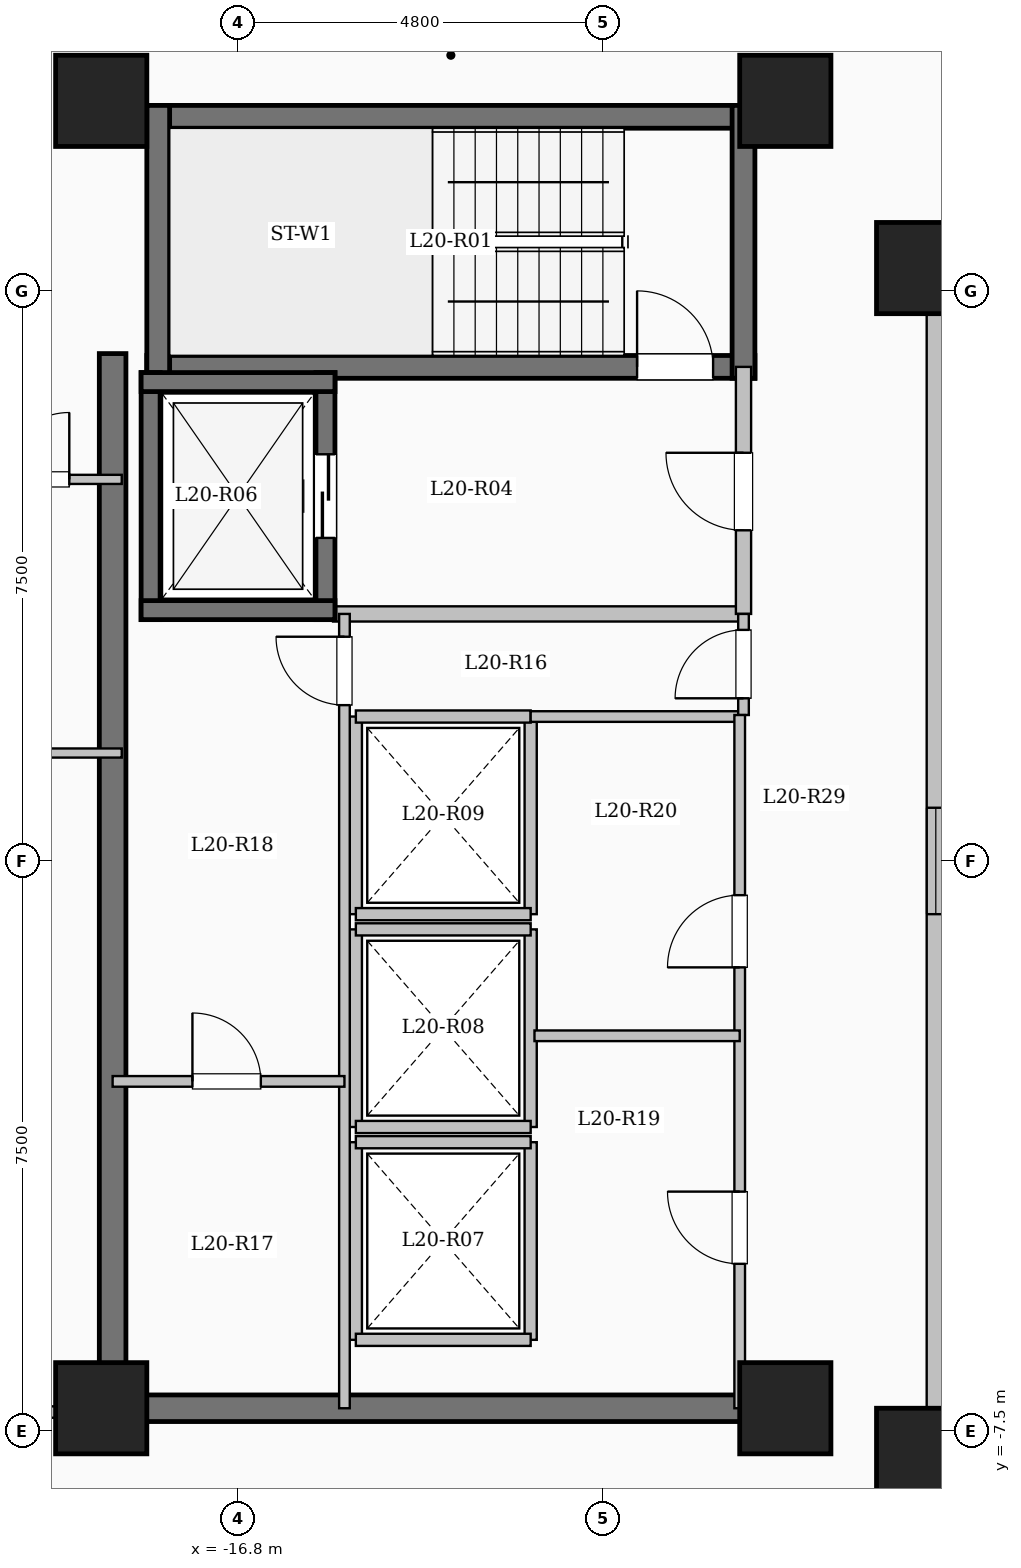
"""IFC4 building model, lengths in metres.
Left out: names, types, materials, properties, quantities, classifications, styles, units other than length and angle.
Written with IfcOpenShell. Run it as: python <this file> out.ifc"""

import sys

from ifc_helpers import new_model, si_unit, direction, frame, frame_2d, origin, origin_2d, place, context, subcontext, project, spatial, rectangle, extrude, element, fill, save


model = new_model("IFC4")
c1 = context("Model", 3, precision=1e-05, world=origin(), true_north=direction((0.0, 1.0)))
c2 = subcontext(c1, "Body", "Model", "MODEL_VIEW")
j1 = project(units=[si_unit("LENGTHUNIT", "METRE"), si_unit("PLANEANGLEUNIT", "RADIAN")], contexts=[c1])
p1 = place(None, origin())
s1 = spatial("IfcSite", under=j1, at=p1, CompositionType="ELEMENT")
p2 = place(p1, origin())
s2 = spatial("IfcBuilding", under=s1, at=p2, CompositionType="ELEMENT")
p3 = place(p2, frame((0.0, 0.0, 78.3)))
s3 = spatial("IfcBuildingStorey", under=s2, at=p3, CompositionType="ELEMENT", Elevation=78.3)
for number, where, z_axis, x_axis in (
    (1, (-7.8, -7.8, 0.0), (0.0, 0.0, 1.0), (1.0, 0.0, 0.0)),
    (2, (-7.8, 7.8, 0.0), (0.0, 0.0, 1.0), (1.0, 0.0, 0.0)),
    (3, (-9.6, -7.2, 0.0), (0.0, 0.0, 1.0), (1.0, 0.0, 0.0)),
    (4, (-9.6, 10.0, 0.0), (0.0, 0.0, 1.0), (1.0, 0.0, 0.0)),
    (5, (-18.6, -7.2, 0.0), (0.0, 0.0, 1.0), (1.0, 0.0, 0.0)),
    (6, (-18.6, 10.0, 0.0), (0.0, 0.0, 1.0), (1.0, 0.0, 0.0)),
):
    element("IfcColumn", number, at=place(p3, frame(where, z_axis=z_axis, x_axis=x_axis)), inside=s3, PredefinedType="COLUMN", context=c2, shape_type="SweptSolid", body=[
        extrude(rectangle(XDim=1.2, YDim=1.2, at=origin_2d()), origin(), (0.0, 0.0, 1.0), 3.35),
    ])
p4 = place(p3, frame((-7.62, -7.62, 0.0), z_axis=(0.0, 0.0, 1.0), x_axis=(1.0, 0.0, 0.0)))
e7 = element("IfcWall", 7, at=p4, inside=s3, PredefinedType="SOLIDWALL", context=c2, shape_type="SweptSolid", body=[
    extrude(rectangle(XDim=15.24, YDim=0.24, at=frame_2d((7.62, 0.0))), origin(), (0.0, 0.0, 1.0), 3.1),
])
p5 = place(p4, frame((6.92, 0.0, 0.95)))
e8 = element("IfcOpeningElement", 8, at=p5, cuts=e7, PredefinedType="OPENING", context=c2, shape_type="SweptSolid", body=[
    extrude(rectangle(XDim=1.4, YDim=1.5, at=frame_2d((0.7, 0.75))), frame((0.0, 0.13, 0.0), z_axis=(0.0, -1.0, 0.0), x_axis=(1.0, 0.0, 0.0)), (0.0, 0.0, 1.0), 0.26),
])
p6 = place(p3, frame((7.62, 7.62, 0.0), z_axis=(0.0, 0.0, 1.0), x_axis=(-1.0, 0.0, 0.0)))
e9 = element("IfcWall", 9, at=p6, inside=s3, PredefinedType="SOLIDWALL", context=c2, shape_type="SweptSolid", body=[
    extrude(rectangle(XDim=15.24, YDim=0.24, at=frame_2d((7.62, 0.0))), origin(), (0.0, 0.0, 1.0), 3.1),
])
p7 = place(p6, frame((6.92, 0.0, 0.95)))
e10 = element("IfcOpeningElement", 10, at=p7, cuts=e9, PredefinedType="OPENING", context=c2, shape_type="SweptSolid", body=[
    extrude(rectangle(XDim=1.4, YDim=1.5, at=frame_2d((0.7, 0.75))), frame((0.0, 0.13, 0.0), z_axis=(0.0, -1.0, 0.0), x_axis=(1.0, 0.0, 0.0)), (0.0, 0.0, 1.0), 0.26),
])
p8 = place(p3, frame((-7.62, 7.62, 0.0), z_axis=(0.0, 0.0, 1.0), x_axis=(0.0, -1.0, 0.0)))
e11 = element("IfcWall", 11, at=p8, inside=s3, PredefinedType="SOLIDWALL", context=c2, shape_type="SweptSolid", body=[
    extrude(rectangle(XDim=15.24, YDim=0.24, at=frame_2d((7.62, 0.0))), origin(), (0.0, 0.0, 1.0), 3.1),
])
p9 = place(p8, frame((6.92, 0.0, 0.95)))
e12 = element("IfcOpeningElement", 12, at=p9, cuts=e11, PredefinedType="OPENING", context=c2, shape_type="SweptSolid", body=[
    extrude(rectangle(XDim=1.4, YDim=1.5, at=frame_2d((0.7, 0.75))), frame((0.0, 0.13, 0.0), z_axis=(0.0, -1.0, 0.0), x_axis=(1.0, 0.0, 0.0)), (0.0, 0.0, 1.0), 0.26),
])
p10 = place(p3, frame((-18.0, 9.79, 0.0), z_axis=(0.0, 0.0, 1.0), x_axis=(1.0, 0.0, 0.0)))
e13 = element("IfcWall", 13, at=p10, inside=s3, PredefinedType="SHEAR", context=c2, shape_type="SweptSolid", body=[
    extrude(rectangle(XDim=8.0, YDim=0.3, at=frame_2d((4.0, 0.0))), origin(), (0.0, 0.0, 1.0), 3.35),
])
p11 = place(p3, frame((-18.0, 6.5, 0.0), z_axis=(0.0, 0.0, 1.0), x_axis=(1.0, 0.0, 0.0)))
e14 = element("IfcWall", 14, at=p11, inside=s3, PredefinedType="SHEAR", context=c2, shape_type="SweptSolid", body=[
    extrude(rectangle(XDim=8.0, YDim=0.3, at=frame_2d((4.0, 0.0))), origin(), (0.0, 0.0, 1.0), 3.35),
])
p12 = place(p11, frame((6.45, 0.0, 0.0)))
e15 = element("IfcOpeningElement", 15, at=p12, cuts=e14, PredefinedType="OPENING", context=c2, shape_type="SweptSolid", body=[
    extrude(rectangle(XDim=1.0, YDim=2.15, at=frame_2d((0.5, 1.075))), frame((0.0, 0.16, 0.0), z_axis=(0.0, -1.0, 0.0), x_axis=(1.0, 0.0, 0.0)), (0.0, 0.0, 1.0), 0.32),
])
for number, where, z_axis, x_axis in (
    (16, (-17.85, 6.35, 0.0), (0.0, 0.0, 1.0), (0.0, 1.0, 0.0)),
    (17, (-10.15, 6.35, 0.0), (0.0, 0.0, 1.0), (0.0, 1.0, 0.0)),
):
    element("IfcWall", number, at=place(p3, frame(where, z_axis=z_axis, x_axis=x_axis)), inside=s3, PredefinedType="SHEAR", context=c2, shape_type="SweptSolid", body=[
        extrude(rectangle(XDim=3.59, YDim=0.3, at=frame_2d((1.795, 0.0))), origin(), (0.0, 0.0, 1.0), 3.35),
    ])
p13 = place(p3, frame((-15.55, 3.25, 0.0), z_axis=(0.0, 0.0, 1.0), x_axis=(1.0, 0.0, 0.0)))
e18 = element("IfcWall", 18, at=p13, inside=s3, PredefinedType="SOLIDWALL", context=c2, shape_type="SweptSolid", body=[
    extrude(rectangle(XDim=5.4, YDim=0.2, at=frame_2d((2.7, 0.0))), origin(), (0.0, 0.0, 1.0), 3.1),
])
p14 = place(p3, frame((-10.15, 3.25, 0.0), z_axis=(0.0, 0.0, 1.0), x_axis=(0.0, 1.0, 0.0)))
e19 = element("IfcWall", 19, at=p14, inside=s3, PredefinedType="SOLIDWALL", context=c2, shape_type="SweptSolid", body=[
    extrude(rectangle(XDim=3.25, YDim=0.2, at=frame_2d((1.625, 0.0))), origin(), (0.0, 0.0, 1.0), 3.1),
])
p15 = place(p14, frame((1.1, 0.0, 0.0)))
e20 = element("IfcOpeningElement", 20, at=p15, cuts=e19, PredefinedType="OPENING", context=c2, shape_type="SweptSolid", body=[
    extrude(rectangle(XDim=1.02, YDim=2.15, at=frame_2d((0.51, 1.075))), frame((0.0, 0.11, 0.0), z_axis=(0.0, -1.0, 0.0), x_axis=(1.0, 0.0, 0.0)), (0.0, 0.0, 1.0), 0.22),
])
p16 = place(p3, frame((-17.95, 3.175, 0.0), z_axis=(0.0, 0.0, 1.0), x_axis=(0.0, 1.0, 0.0)))
e21 = element("IfcWall", 21, at=p16, inside=s3, PredefinedType="SHEAR", context=c2, shape_type="SweptSolid", body=[
    extrude(rectangle(XDim=3.25, YDim=0.25, at=frame_2d((1.625, 0.0))), origin(), (0.0, 0.0, 1.0), 3.35),
])
p17 = place(p3, frame((-15.65, 3.175, 0.0), z_axis=(0.0, 0.0, 1.0), x_axis=(0.0, 1.0, 0.0)))
e22 = element("IfcWall", 22, at=p17, inside=s3, PredefinedType="SHEAR", context=c2, shape_type="SweptSolid", body=[
    extrude(rectangle(XDim=3.25, YDim=0.25, at=frame_2d((1.625, 0.0))), origin(), (0.0, 0.0, 1.0), 3.35),
])
p18 = place(p17, frame((1.075, 0.0, 0.0)))
e23 = element("IfcOpeningElement", 23, at=p18, cuts=e22, PredefinedType="OPENING", context=c2, shape_type="SweptSolid", body=[
    extrude(rectangle(XDim=1.1, YDim=2.15, at=frame_2d((0.55, 1.075))), frame((0.0, 0.135, 0.0), z_axis=(0.0, -1.0, 0.0), x_axis=(1.0, 0.0, 0.0)), (0.0, 0.0, 1.0), 0.27),
])
for number, where, z_axis, x_axis in (
    (24, (-18.075, 3.3, 0.0), (0.0, 0.0, 1.0), (1.0, 0.0, 0.0)),
    (25, (-18.075, 6.3, 0.0), (0.0, 0.0, 1.0), (1.0, 0.0, 0.0)),
):
    element("IfcWall", number, at=place(p3, frame(where, z_axis=z_axis, x_axis=x_axis)), inside=s3, PredefinedType="SHEAR", context=c2, shape_type="SweptSolid", body=[
        extrude(rectangle(XDim=2.55, YDim=0.25, at=frame_2d((1.275, 0.0))), origin(), (0.0, 0.0, 1.0), 3.35),
    ])
for number, where, z_axis, x_axis in (
    (26, (-15.25, -6.3, 0.0), (0.0, 0.0, 1.0), (0.0, 1.0, 0.0)),
    (27, (-12.95, -6.3, 0.0), (0.0, 0.0, 1.0), (0.0, 1.0, 0.0)),
):
    element("IfcWall", number, at=place(p3, frame(where, z_axis=z_axis, x_axis=x_axis)), inside=s3, PredefinedType="SOLIDWALL", context=c2, shape_type="SweptSolid", body=[
        extrude(rectangle(XDim=2.6, YDim=0.16, at=frame_2d((1.3, 0.0))), origin(), (0.0, 0.0, 1.0), 3.1),
    ])
for number, where, z_axis, x_axis in (
    (28, (-15.25, -6.3, 0.0), (0.0, 0.0, 1.0), (1.0, 0.0, 0.0)),
    (29, (-15.25, -3.7, 0.0), (0.0, 0.0, 1.0), (1.0, 0.0, 0.0)),
):
    element("IfcWall", number, at=place(p3, frame(where, z_axis=z_axis, x_axis=x_axis)), inside=s3, PredefinedType="SOLIDWALL", context=c2, shape_type="SweptSolid", body=[
        extrude(rectangle(XDim=2.3, YDim=0.16, at=frame_2d((1.15, 0.0))), origin(), (0.0, 0.0, 1.0), 3.1),
    ])
for number, where, z_axis, x_axis in (
    (30, (-15.25, -3.5, 0.0), (0.0, 0.0, 1.0), (0.0, 1.0, 0.0)),
    (31, (-12.95, -3.5, 0.0), (0.0, 0.0, 1.0), (0.0, 1.0, 0.0)),
):
    element("IfcWall", number, at=place(p3, frame(where, z_axis=z_axis, x_axis=x_axis)), inside=s3, PredefinedType="SOLIDWALL", context=c2, shape_type="SweptSolid", body=[
        extrude(rectangle(XDim=2.6, YDim=0.16, at=frame_2d((1.3, 0.0))), origin(), (0.0, 0.0, 1.0), 3.1),
    ])
for number, where, z_axis, x_axis in (
    (32, (-15.25, -3.5, 0.0), (0.0, 0.0, 1.0), (1.0, 0.0, 0.0)),
    (33, (-15.25, -0.9, 0.0), (0.0, 0.0, 1.0), (1.0, 0.0, 0.0)),
):
    element("IfcWall", number, at=place(p3, frame(where, z_axis=z_axis, x_axis=x_axis)), inside=s3, PredefinedType="SOLIDWALL", context=c2, shape_type="SweptSolid", body=[
        extrude(rectangle(XDim=2.3, YDim=0.16, at=frame_2d((1.15, 0.0))), origin(), (0.0, 0.0, 1.0), 3.1),
    ])
for number, where, z_axis, x_axis in (
    (34, (-15.25, -0.7, 0.0), (0.0, 0.0, 1.0), (0.0, 1.0, 0.0)),
    (35, (-12.95, -0.7, 0.0), (0.0, 0.0, 1.0), (0.0, 1.0, 0.0)),
):
    element("IfcWall", number, at=place(p3, frame(where, z_axis=z_axis, x_axis=x_axis)), inside=s3, PredefinedType="SOLIDWALL", context=c2, shape_type="SweptSolid", body=[
        extrude(rectangle(XDim=2.6, YDim=0.16, at=frame_2d((1.3, 0.0))), origin(), (0.0, 0.0, 1.0), 3.1),
    ])
for number, where, z_axis, x_axis in (
    (36, (-15.25, -0.7, 0.0), (0.0, 0.0, 1.0), (1.0, 0.0, 0.0)),
    (37, (-15.25, 1.9, 0.0), (0.0, 0.0, 1.0), (1.0, 0.0, 0.0)),
):
    element("IfcWall", number, at=place(p3, frame(where, z_axis=z_axis, x_axis=x_axis)), inside=s3, PredefinedType="SOLIDWALL", context=c2, shape_type="SweptSolid", body=[
        extrude(rectangle(XDim=2.3, YDim=0.16, at=frame_2d((1.15, 0.0))), origin(), (0.0, 0.0, 1.0), 3.1),
    ])
p19 = place(p3, frame((-18.45, -7.375, 0.0), z_axis=(0.0, 0.0, 1.0), x_axis=(0.0, 1.0, 0.0)))
e38 = element("IfcWall", 38, at=p19, inside=s3, PredefinedType="SHEAR", context=c2, shape_type="SweptSolid", body=[
    extrude(rectangle(XDim=14.05, YDim=0.35, at=frame_2d((7.025, 0.0))), origin(), (0.0, 0.0, 1.0), 3.35),
])
p20 = place(p3, frame((-18.625, -7.2, 0.0), z_axis=(0.0, 0.0, 1.0), x_axis=(1.0, 0.0, 0.0)))
e39 = element("IfcWall", 39, at=p20, inside=s3, PredefinedType="SHEAR", context=c2, shape_type="SweptSolid", body=[
    extrude(rectangle(XDim=8.55, YDim=0.35, at=frame_2d((4.275, 0.0))), origin(), (0.0, 0.0, 1.0), 3.35),
])
p21 = place(p3, frame((-12.95, 1.9, 0.0), z_axis=(0.0, 0.0, 1.0), x_axis=(1.0, 0.0, 0.0)))
e40 = element("IfcWall", 40, at=p21, inside=s3, PredefinedType="PARTITIONING", context=c2, shape_type="SweptSolid", body=[
    extrude(rectangle(XDim=2.8, YDim=0.14, at=frame_2d((1.4, 0.0))), origin(), (0.0, 0.0, 1.0), 3.1),
])
p22 = place(p3, frame((-10.15, 1.92, 0.0), z_axis=(0.0, 0.0, 1.0), x_axis=(0.0, 1.0, 0.0)))
e41 = element("IfcWall", 41, at=p22, inside=s3, PredefinedType="PARTITIONING", context=c2, shape_type="SweptSolid", body=[
    extrude(rectangle(XDim=1.33, YDim=0.14, at=frame_2d((0.665, 0.0))), origin(), (0.0, 0.0, 1.0), 3.1),
])
p23 = place(p22, frame((0.22, 0.0, 0.0)))
e42 = element("IfcOpeningElement", 42, at=p23, cuts=e41, PredefinedType="OPENING", context=c2, shape_type="SweptSolid", body=[
    extrude(rectangle(XDim=0.9, YDim=2.08, at=frame_2d((0.45, 1.04))), frame((0.0, 0.08, 0.0), z_axis=(0.0, -1.0, 0.0), x_axis=(1.0, 0.0, 0.0)), (0.0, 0.0, 1.0), 0.16),
])
p24 = place(p3, frame((-15.4, -7.2, 0.0), z_axis=(0.0, 0.0, 1.0), x_axis=(0.0, 1.0, 0.0)))
e43 = element("IfcWall", 43, at=p24, inside=s3, PredefinedType="PARTITIONING", context=c2, shape_type="SweptSolid", body=[
    extrude(rectangle(XDim=10.45, YDim=0.14, at=frame_2d((5.225, 0.0))), origin(), (0.0, 0.0, 1.0), 3.1),
])
p25 = place(p24, frame((9.25, 0.0, 0.0)))
e44 = element("IfcOpeningElement", 44, at=p25, cuts=e43, PredefinedType="OPENING", context=c2, shape_type="SweptSolid", body=[
    extrude(rectangle(XDim=0.9, YDim=2.08, at=frame_2d((0.45, 1.04))), frame((0.0, 0.08, 0.0), z_axis=(0.0, -1.0, 0.0), x_axis=(1.0, 0.0, 0.0)), (0.0, 0.0, 1.0), 0.16),
])
p26 = place(p3, frame((-18.45, -2.9, 0.0), z_axis=(0.0, 0.0, 1.0), x_axis=(1.0, 0.0, 0.0)))
e45 = element("IfcWall", 45, at=p26, inside=s3, PredefinedType="PARTITIONING", context=c2, shape_type="SweptSolid", body=[
    extrude(rectangle(XDim=3.05, YDim=0.14, at=frame_2d((1.525, 0.0))), origin(), (0.0, 0.0, 1.0), 3.1),
])
p27 = place(p26, frame((1.05, 0.0, 0.0)))
e46 = element("IfcOpeningElement", 46, at=p27, cuts=e45, PredefinedType="OPENING", context=c2, shape_type="SweptSolid", body=[
    extrude(rectangle(XDim=0.9, YDim=2.08, at=frame_2d((0.45, 1.04))), frame((0.0, 0.08, 0.0), z_axis=(0.0, -1.0, 0.0), x_axis=(1.0, 0.0, 0.0)), (0.0, 0.0, 1.0), 0.16),
])
p28 = place(p3, frame((-10.2, -7.2, 0.0), z_axis=(0.0, 0.0, 1.0), x_axis=(0.0, 1.0, 0.0)))
e47 = element("IfcWall", 47, at=p28, inside=s3, PredefinedType="PARTITIONING", context=c2, shape_type="SweptSolid", body=[
    extrude(rectangle(XDim=9.12, YDim=0.14, at=frame_2d((4.56, 0.0))), origin(), (0.0, 0.0, 1.0), 3.1),
])
p29 = place(p28, frame((1.9, 0.0, 0.0)))
e48 = element("IfcOpeningElement", 48, at=p29, cuts=e47, PredefinedType="OPENING", context=c2, shape_type="SweptSolid", body=[
    extrude(rectangle(XDim=0.95, YDim=2.12, at=frame_2d((0.475, 1.06))), frame((0.0, 0.08, 0.0), z_axis=(0.0, -1.0, 0.0), x_axis=(1.0, 0.0, 0.0)), (0.0, 0.0, 1.0), 0.16),
])
p30 = place(p28, frame((5.8, 0.0, 0.0)))
e49 = element("IfcOpeningElement", 49, at=p30, cuts=e47, PredefinedType="OPENING", context=c2, shape_type="SweptSolid", body=[
    extrude(rectangle(XDim=0.95, YDim=2.12, at=frame_2d((0.475, 1.06))), frame((0.0, 0.08, 0.0), z_axis=(0.0, -1.0, 0.0), x_axis=(1.0, 0.0, 0.0)), (0.0, 0.0, 1.0), 0.16),
])
p31 = place(p3, frame((-12.9, -2.3, 0.0), z_axis=(0.0, 0.0, 1.0), x_axis=(1.0, 0.0, 0.0)))
e50 = element("IfcWall", 50, at=p31, inside=s3, PredefinedType="PARTITIONING", context=c2, shape_type="SweptSolid", body=[
    extrude(rectangle(XDim=2.7, YDim=0.14, at=frame_2d((1.35, 0.0))), origin(), (0.0, 0.0, 1.0), 3.1),
])
p32 = place(p3, frame((-26.88, -7.25, 0.0), z_axis=(0.0, 0.0, 1.0), x_axis=(1.0, 0.0, 0.0)))
e51 = element("IfcWall", 51, at=p32, inside=s3, PredefinedType="PARTITIONING", context=c2, shape_type="SweptSolid", body=[
    extrude(rectangle(XDim=8.43, YDim=0.15, at=frame_2d((4.215, 0.0))), origin(), (0.0, 0.0, 1.0), 3.1),
])
p33 = place(p32, frame((5.33, 0.0, 0.0)))
e52 = element("IfcOpeningElement", 52, at=p33, cuts=e51, PredefinedType="OPENING", context=c2, shape_type="SweptSolid", body=[
    extrude(rectangle(XDim=0.96, YDim=2.15, at=frame_2d((0.48, 1.075))), frame((0.0, 0.085, 0.0), z_axis=(0.0, -1.0, 0.0), x_axis=(1.0, 0.0, 0.0)), (0.0, 0.0, 1.0), 0.17),
])
p34 = place(p3, frame((-27.0, 1.42, 0.0), z_axis=(0.0, 0.0, 1.0), x_axis=(1.0, 0.0, 0.0)))
e53 = element("IfcWall", 53, at=p34, inside=s3, PredefinedType="PARTITIONING", context=c2, shape_type="SweptSolid", body=[
    extrude(rectangle(XDim=8.67, YDim=0.12, at=frame_2d((4.335, 0.0))), origin(), (0.0, 0.0, 1.0), 3.1),
])
p35 = place(p34, frame((1.763, 0.0, 0.0)))
e54 = element("IfcOpeningElement", 54, at=p35, cuts=e53, PredefinedType="OPENING", context=c2, shape_type="SweptSolid", body=[
    extrude(rectangle(XDim=0.88, YDim=2.1, at=frame_2d((0.44, 1.05))), frame((0.0, 0.07, 0.0), z_axis=(0.0, -1.0, 0.0), x_axis=(1.0, 0.0, 0.0)), (0.0, 0.0, 1.0), 0.14),
])
p36 = place(p34, frame((5.928, 0.0, 0.0)))
e55 = element("IfcOpeningElement", 55, at=p36, cuts=e53, PredefinedType="OPENING", context=c2, shape_type="SweptSolid", body=[
    extrude(rectangle(XDim=0.88, YDim=2.1, at=frame_2d((0.44, 1.05))), frame((0.0, 0.07, 0.0), z_axis=(0.0, -1.0, 0.0), x_axis=(1.0, 0.0, 0.0)), (0.0, 0.0, 1.0), 0.14),
])
p37 = place(p3, frame((-27.0, 5.02, 0.0), z_axis=(0.0, 0.0, 1.0), x_axis=(1.0, 0.0, 0.0)))
e56 = element("IfcWall", 56, at=p37, inside=s3, PredefinedType="PARTITIONING", context=c2, shape_type="SweptSolid", body=[
    extrude(rectangle(XDim=8.67, YDim=0.12, at=frame_2d((4.335, 0.0))), origin(), (0.0, 0.0, 1.0), 3.1),
])
p38 = place(p37, frame((7.1, 0.0, 0.0)))
e57 = element("IfcOpeningElement", 57, at=p38, cuts=e56, PredefinedType="OPENING", context=c2, shape_type="SweptSolid", body=[
    extrude(rectangle(XDim=0.88, YDim=2.1, at=frame_2d((0.44, 1.05))), frame((0.0, 0.07, 0.0), z_axis=(0.0, -1.0, 0.0), x_axis=(1.0, 0.0, 0.0)), (0.0, 0.0, 1.0), 0.14),
])
p39 = place(p9, origin())
e58 = element("IfcWindow", 58, at=p39, inside=s3, PartitioningType="SINGLE_PANEL", PredefinedType="WINDOW", context=c2, shape_type="SweptSolid", body=[
    extrude(rectangle(XDim=1.4, YDim=1.5, at=frame_2d((0.7, 0.75))), frame((0.0, 0.03, 0.0), z_axis=(0.0, -1.0, 0.0), x_axis=(1.0, 0.0, 0.0)), (0.0, 0.0, 1.0), 0.06),
])
fill(e12, e58)
p40 = place(p12, origin())
e59 = element("IfcDoor", 59, at=p40, inside=s3, OperationType="SINGLE_SWING_LEFT", PredefinedType="DOOR", context=c2, shape_type="SweptSolid", body=[
    extrude(rectangle(XDim=1.0, YDim=2.15, at=frame_2d((0.5, 1.075))), frame((0.0, 0.025, 0.0), z_axis=(0.0, -1.0, 0.0), x_axis=(1.0, 0.0, 0.0)), (0.0, 0.0, 1.0), 0.05),
])
fill(e15, e59)
p41 = place(p15, origin())
e60 = element("IfcDoor", 60, at=p41, inside=s3, OperationType="SINGLE_SWING_RIGHT", PredefinedType="DOOR", context=c2, shape_type="SweptSolid", body=[
    extrude(rectangle(XDim=1.02, YDim=2.15, at=frame_2d((0.51, 1.075))), frame((0.0, 0.025, 0.0), z_axis=(0.0, -1.0, 0.0), x_axis=(1.0, 0.0, 0.0)), (0.0, 0.0, 1.0), 0.05),
])
fill(e20, e60)
p42 = place(p18, origin())
e61 = element("IfcDoor", 61, at=p42, inside=s3, OperationType="SLIDING_TO_LEFT", PredefinedType="DOOR", context=c2, shape_type="SweptSolid", body=[
    extrude(rectangle(XDim=1.1, YDim=2.15, at=frame_2d((0.55, 1.075))), frame((0.0, 0.025, 0.0), z_axis=(0.0, -1.0, 0.0), x_axis=(1.0, 0.0, 0.0)), (0.0, 0.0, 1.0), 0.05),
])
fill(e23, e61)
p43 = place(p23, origin())
e62 = element("IfcDoor", 62, at=p43, inside=s3, OperationType="SINGLE_SWING_LEFT", PredefinedType="DOOR", context=c2, shape_type="SweptSolid", body=[
    extrude(rectangle(XDim=0.9, YDim=2.08, at=frame_2d((0.45, 1.04))), frame((0.0, 0.025, 0.0), z_axis=(0.0, -1.0, 0.0), x_axis=(1.0, 0.0, 0.0)), (0.0, 0.0, 1.0), 0.05),
])
fill(e42, e62)
p44 = place(p25, origin())
e63 = element("IfcDoor", 63, at=p44, inside=s3, OperationType="SINGLE_SWING_RIGHT", PredefinedType="DOOR", context=c2, shape_type="SweptSolid", body=[
    extrude(rectangle(XDim=0.9, YDim=2.08, at=frame_2d((0.45, 1.04))), frame((0.0, 0.025, 0.0), z_axis=(0.0, -1.0, 0.0), x_axis=(1.0, 0.0, 0.0)), (0.0, 0.0, 1.0), 0.05),
])
fill(e44, e63)
p45 = place(p27, origin())
e64 = element("IfcDoor", 64, at=p45, inside=s3, OperationType="SINGLE_SWING_LEFT", PredefinedType="DOOR", context=c2, shape_type="SweptSolid", body=[
    extrude(rectangle(XDim=0.9, YDim=2.08, at=frame_2d((0.45, 1.04))), frame((0.0, 0.025, 0.0), z_axis=(0.0, -1.0, 0.0), x_axis=(1.0, 0.0, 0.0)), (0.0, 0.0, 1.0), 0.05),
])
fill(e46, e64)
p46 = place(p29, origin())
e65 = element("IfcDoor", 65, at=p46, inside=s3, OperationType="SINGLE_SWING_RIGHT", PredefinedType="DOOR", context=c2, shape_type="SweptSolid", body=[
    extrude(rectangle(XDim=0.95, YDim=2.12, at=frame_2d((0.475, 1.06))), frame((0.0, 0.025, 0.0), z_axis=(0.0, -1.0, 0.0), x_axis=(1.0, 0.0, 0.0)), (0.0, 0.0, 1.0), 0.05),
])
fill(e48, e65)
p47 = place(p30, origin())
e66 = element("IfcDoor", 66, at=p47, inside=s3, OperationType="SINGLE_SWING_LEFT", PredefinedType="DOOR", context=c2, shape_type="SweptSolid", body=[
    extrude(rectangle(XDim=0.95, YDim=2.12, at=frame_2d((0.475, 1.06))), frame((0.0, 0.025, 0.0), z_axis=(0.0, -1.0, 0.0), x_axis=(1.0, 0.0, 0.0)), (0.0, 0.0, 1.0), 0.05),
])
fill(e49, e66)
p48 = place(p38, origin())
e67 = element("IfcDoor", 67, at=p48, inside=s3, OperationType="SINGLE_SWING_RIGHT", PredefinedType="DOOR", context=c2, shape_type="SweptSolid", body=[
    extrude(rectangle(XDim=0.88, YDim=2.1, at=frame_2d((0.44, 1.05))), frame((0.0, 0.025, 0.0), z_axis=(0.0, -1.0, 0.0), x_axis=(1.0, 0.0, 0.0)), (0.0, 0.0, 1.0), 0.05),
])
fill(e57, e67)
save(model, sys.argv[1])
